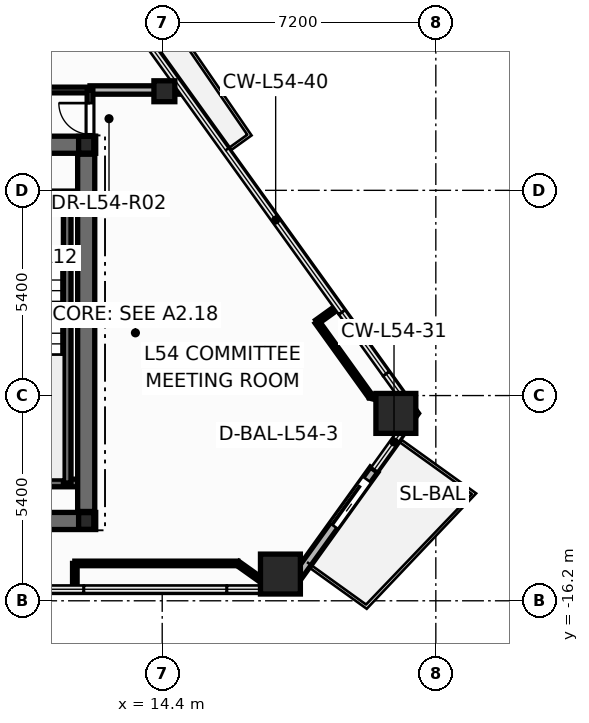
"""IFC4 building model, lengths in metres.
Left out: names, types, materials, properties, quantities, classifications, styles, units other than length and angle.
Written with IfcOpenShell. Run it as: python <this file> out.ifc"""

import sys

from ifc_helpers import new_model, si_unit, direction, frame, frame_2d, origin, origin_2d, place, context, subcontext, project, spatial, rectangle, hollow_rectangle, hollow_circle, i_section, extrude, element, fill, save


model = new_model("IFC4")
c1 = context("Model", 3, precision=1e-05, world=origin(), true_north=direction((0.0, 1.0)))
c2 = subcontext(c1, "Body", "Model", "MODEL_VIEW")
j1 = project(units=[si_unit("LENGTHUNIT", "METRE"), si_unit("PLANEANGLEUNIT", "RADIAN")], contexts=[c1])
p1 = place(None, origin())
s1 = spatial("IfcSite", under=j1, at=p1, CompositionType="ELEMENT")
p2 = place(p1, origin())
s2 = spatial("IfcBuilding", under=s1, at=p2, CompositionType="ELEMENT")
p3 = place(p2, frame((0.0, 0.0, 207.3)))
s3 = spatial("IfcBuildingStorey", under=s2, at=p3, CompositionType="ELEMENT", Elevation=207.3)
for number, where, z_axis, x_axis in (
    (1, (17.511, -15.497, 0.0), (0.0, 0.0, 1.0), (1.0, 0.0, 0.0)),
    (2, (20.548, -11.27, 0.0), (0.0, 0.0, 1.0), (1.0, 0.0, 0.0)),
):
    element("IfcColumn", number, at=place(p3, frame(where, z_axis=z_axis, x_axis=x_axis)), inside=s3, PredefinedType="COLUMN", context=c2, shape_type="SweptSolid", body=[
        extrude(hollow_rectangle(XDim=1.05, YDim=1.05, WallThickness=0.045, at=origin_2d()), origin(), (0.0, 0.0, 1.0), 3.6),
    ])
p4 = place(p3, frame((14.457, -2.793, 0.0), z_axis=(0.0, 0.0, 1.0), x_axis=(1.0, 0.0, 0.0)))
e3 = element("IfcColumn", 3, at=p4, inside=s3, PredefinedType="COLUMN", context=c2, shape_type="SweptSolid", body=[
    extrude(hollow_circle(Radius=0.275, WallThickness=0.024, at=origin_2d()), origin(), (0.0, 0.0, 1.0), 3.6),
])
for number, where, z_axis, x_axis in (
    (4, (12.4, -14.1, 0.0), (0.0, 0.0, 1.0), (1.0, 0.0, 0.0)),
    (5, (12.4, -4.2, 0.0), (0.0, 0.0, 1.0), (1.0, 0.0, 0.0)),
):
    element("IfcColumn", number, at=place(p3, frame(where, z_axis=z_axis, x_axis=x_axis)), inside=s3, PredefinedType="COLUMN", context=c2, shape_type="SweptSolid", body=[
        extrude(i_section(OverallWidth=0.4, OverallDepth=0.44, WebThickness=0.028, FlangeThickness=0.04, at=origin_2d()), origin(), (0.0, 0.0, 1.0), 3.6),
    ])
p5 = place(p3, frame((17.739, -15.864, -0.015), z_axis=(0.0, 0.0, 1.0), x_axis=(0.5835494265, 0.812077623649, 0.0)))
e6 = element("IfcWall", 6, at=p5, inside=s3, PredefinedType="STANDARD", context=c2, shape_type="SweptSolid", body=[
    extrude(rectangle(XDim=3.833, YDim=0.24, at=frame_2d((1.917, 0.0))), origin(), (0.0, 0.0, 1.0), 2.802),
])
p6 = place(p5, frame((2.013, 0.0, 0.015)))
e7 = element("IfcOpeningElement", 7, at=p6, cuts=e6, PredefinedType="OPENING", context=c2, shape_type="SweptSolid", body=[
    extrude(rectangle(XDim=1.506, YDim=2.204, at=frame_2d((0.75, 1.102))), frame((0.0, 0.13, 0.0), z_axis=(0.0, -1.0, 0.0), x_axis=(1.0, 0.0, 0.0)), (0.0, 0.0, 1.0), 0.26),
])
p7 = place(p3, frame((-12.65, -14.1, 0.0), z_axis=(0.0, 0.0, 1.0), x_axis=(1.0, 0.0, 0.0)))
e8 = element("IfcWall", 8, at=p7, inside=s3, PredefinedType="SHEAR", context=c2, shape_type="SweptSolid", body=[
    extrude(rectangle(XDim=25.3, YDim=0.45, at=frame_2d((12.65, 0.0))), origin(), (0.0, 0.0, 1.0), 3.6),
])
p8 = place(p3, frame((-12.65, -4.2, 0.0), z_axis=(0.0, 0.0, 1.0), x_axis=(1.0, 0.0, 0.0)))
e9 = element("IfcWall", 9, at=p8, inside=s3, PredefinedType="SHEAR", context=c2, shape_type="SweptSolid", body=[
    extrude(rectangle(XDim=25.3, YDim=0.45, at=frame_2d((12.65, 0.0))), origin(), (0.0, 0.0, 1.0), 3.6),
])
p9 = place(p8, frame((1.85, 0.0, 0.0)))
e10 = element("IfcOpeningElement", 10, at=p9, cuts=e9, PredefinedType="OPENING", context=c2, shape_type="SweptSolid", body=[
    extrude(rectangle(XDim=0.756, YDim=2.054, at=frame_2d((0.375, 1.027))), frame((0.0, 0.235, 0.0), z_axis=(0.0, -1.0, 0.0), x_axis=(1.0, 0.0, 0.0)), (0.0, 0.0, 1.0), 0.47),
])
p10 = place(p8, frame((22.65, 0.0, 0.0)))
e11 = element("IfcOpeningElement", 11, at=p10, cuts=e9, PredefinedType="OPENING", context=c2, shape_type="SweptSolid", body=[
    extrude(rectangle(XDim=0.756, YDim=2.054, at=frame_2d((0.375, 1.027))), frame((0.0, 0.235, 0.0), z_axis=(0.0, -1.0, 0.0), x_axis=(1.0, 0.0, 0.0)), (0.0, 0.0, 1.0), 0.47),
])
p11 = place(p8, frame((5.85, 0.0, 0.0)))
e12 = element("IfcOpeningElement", 12, at=p11, cuts=e9, PredefinedType="OPENING", context=c2, shape_type="SweptSolid", body=[
    extrude(rectangle(XDim=1.006, YDim=2.104, at=frame_2d((0.5, 1.052))), frame((0.0, 0.235, 0.0), z_axis=(0.0, -1.0, 0.0), x_axis=(1.0, 0.0, 0.0)), (0.0, 0.0, 1.0), 0.47),
])
p12 = place(p8, frame((10.35, 0.0, 0.0)))
e13 = element("IfcOpeningElement", 13, at=p12, cuts=e9, PredefinedType="OPENING", context=c2, shape_type="SweptSolid", body=[
    extrude(rectangle(XDim=1.406, YDim=2.154, at=frame_2d((0.7, 1.077))), frame((0.0, 0.235, 0.0), z_axis=(0.0, -1.0, 0.0), x_axis=(1.0, 0.0, 0.0)), (0.0, 0.0, 1.0), 0.47),
])
p13 = place(p8, frame((18.45, 0.0, 0.0)))
e14 = element("IfcOpeningElement", 14, at=p13, cuts=e9, PredefinedType="OPENING", context=c2, shape_type="SweptSolid", body=[
    extrude(rectangle(XDim=1.006, YDim=2.104, at=frame_2d((0.5, 1.052))), frame((0.0, 0.235, 0.0), z_axis=(0.0, -1.0, 0.0), x_axis=(1.0, 0.0, 0.0)), (0.0, 0.0, 1.0), 0.47),
])
for number, where, z_axis, x_axis in (
    (15, (8.48, -5.52, 0.0), (0.0, 0.0, 1.0), (1.0, 0.0, 0.0)),
    (16, (8.48, -13.1, 0.0), (0.0, 0.0, 1.0), (1.0, 0.0, 0.0)),
):
    element("IfcWall", number, at=place(p3, frame(where, z_axis=z_axis, x_axis=x_axis)), inside=s3, PredefinedType="SOLIDWALL", context=c2, shape_type="SweptSolid", body=[
        extrude(rectangle(XDim=3.87, YDim=0.2, at=frame_2d((1.935, 0.0))), origin(), (0.0, 0.0, 1.0), 3.6),
    ])
p14 = place(p3, frame((11.9, -13.1, 0.0), z_axis=(0.0, 0.0, 1.0), x_axis=(0.0, 1.0, 0.0)))
e17 = element("IfcWall", 17, at=p14, inside=s3, PredefinedType="SOLIDWALL", context=c2, shape_type="SweptSolid", body=[
    extrude(rectangle(XDim=7.58, YDim=0.2, at=frame_2d((3.79, 0.0))), origin(), (0.0, 0.0, 1.0), 3.6),
])
p15 = place(p3, frame((12.4, -13.85, 0.0), z_axis=(0.0, 0.0, 1.0), x_axis=(0.0, 1.0, 0.0)))
e18 = element("IfcWall", 18, at=p15, inside=s3, PredefinedType="SHEAR", context=c2, shape_type="SweptSolid", body=[
    extrude(rectangle(XDim=9.4, YDim=0.45, at=frame_2d((4.7, 0.0))), origin(), (0.0, 0.0, 1.0), 3.6),
])
p16 = place(p3, frame((4.74, -2.76, 0.0), z_axis=(0.0, 0.0, 1.0), x_axis=(1.0, 0.0, 0.0)))
e19 = element("IfcWall", 19, at=p16, inside=s3, PredefinedType="PARTITIONING", context=c2, shape_type="SweptSolid", body=[
    extrude(rectangle(XDim=7.76, YDim=0.15, at=frame_2d((3.88, 0.0))), origin(), (0.0, 0.0, 1.0), 2.32),
])
p17 = place(p16, frame((4.022, 0.0, 0.0)))
e20 = element("IfcOpeningElement", 20, at=p17, cuts=e19, PredefinedType="OPENING", context=c2, shape_type="SweptSolid", body=[
    extrude(rectangle(XDim=0.956, YDim=2.104, at=frame_2d((0.475, 1.052))), frame((0.0, 0.085, 0.0), z_axis=(0.0, -1.0, 0.0), x_axis=(1.0, 0.0, 0.0)), (0.0, 0.0, 1.0), 0.17),
])
p18 = place(p3, frame((12.101, -15.217, 0.0), z_axis=(0.0, 0.0, 1.0), x_axis=(1.0, 0.0, 0.0)))
e21 = element("IfcWall", 21, at=p18, inside=s3, PredefinedType="PARTITIONING", context=c2, shape_type="SweptSolid", body=[
    extrude(rectangle(XDim=4.288, YDim=0.12, at=frame_2d((2.144, 0.0))), origin(), (0.0, 0.0, 1.0), 3.345),
])
p19 = place(p3, frame((12.5, -2.76, 0.0), z_axis=(0.0, 0.0, 1.0), x_axis=(1.0, 0.0, 0.0)))
e22 = element("IfcWall", 22, at=p19, inside=s3, PredefinedType="PARTITIONING", context=c2, shape_type="SweptSolid", body=[
    extrude(rectangle(XDim=2.426, YDim=0.22, at=frame_2d((1.213, 0.0))), origin(), (0.0, 0.0, 1.0), 2.62),
])
p20 = place(p3, frame((19.874, -10.811, 0.0), z_axis=(0.0, 0.0, 1.0), x_axis=(-0.583564770882, 0.812066597137, 0.0)))
e23 = element("IfcWall", 23, at=p20, inside=s3, PredefinedType="PARTITIONING", context=c2, shape_type="SweptSolid", body=[
    extrude(rectangle(XDim=2.4, YDim=0.12, at=frame_2d((1.2, 0.0))), origin(), (0.0, 0.0, 1.0), 2.32),
])
p21 = place(p3, frame((12.5, -4.24, 0.0), z_axis=(0.0, 0.0, 1.0), x_axis=(0.0, 1.0, 0.0)))
e24 = element("IfcWall", 24, at=p21, inside=s3, PredefinedType="PARTITIONING", context=c2, shape_type="SweptSolid", body=[
    extrude(rectangle(XDim=1.48, YDim=0.15, at=frame_2d((0.74, 0.0))), origin(), (0.0, 0.0, 1.0), 2.32),
])
p22 = place(p21, frame((0.315, 0.0, 0.0)))
e25 = element("IfcOpeningElement", 25, at=p22, cuts=e24, PredefinedType="OPENING", context=c2, shape_type="SweptSolid", body=[
    extrude(rectangle(XDim=0.826, YDim=2.104, at=frame_2d((0.41, 1.052))), frame((0.0, 0.085, 0.0), z_axis=(0.0, -1.0, 0.0), x_axis=(1.0, 0.0, 0.0)), (0.0, 0.0, 1.0), 0.17),
])
p23 = place(p3, frame((16.389, -15.217, 0.0), z_axis=(0.0, 0.0, 1.0), x_axis=(0.814775258606, -0.579776920861, 0.0)))
e26 = element("IfcWall", 26, at=p23, inside=s3, PredefinedType="PARTITIONING", context=c2, shape_type="SweptSolid", body=[
    extrude(rectangle(XDim=0.854, YDim=0.12, at=frame_2d((0.427, 0.0))), origin(), (0.0, 0.0, 1.0), 2.787),
])
p24 = place(p3, frame((20.698, -11.027, 0.0), z_axis=(0.0, 0.0, 1.0), x_axis=(-0.967403978064, 0.253238115667, 0.0)))
e27 = element("IfcWall", 27, at=p24, inside=s3, PredefinedType="PARTITIONING", context=c2, shape_type="SweptSolid", body=[
    extrude(rectangle(XDim=0.852, YDim=0.12, at=frame_2d((0.426, 0.0))), origin(), (0.0, 0.0, 1.0), 2.32),
])
for number, where, z_axis, x_axis in (
    (28, (12.101, -15.887, 0.0), (0.0, 0.0, 1.0), (0.0, 1.0, 0.0)),
    (29, (18.474, -8.862, 0.0), (0.0, 0.0, 1.0), (0.812, 0.584, 0.0)),
):
    element("IfcWall", number, at=place(p3, frame(where, z_axis=z_axis, x_axis=x_axis)), inside=s3, PredefinedType="PARTITIONING", context=c2, shape_type="SweptSolid", body=[
        extrude(rectangle(XDim=0.67, YDim=0.12, at=frame_2d((0.335, 0.0))), origin(), (0.0, 0.0, 1.0), 2.787),
    ])
p25 = place(p6, origin())
e30 = element("IfcDoor", 30, at=p25, inside=s3, OperationType="SLIDING_TO_RIGHT", PredefinedType="DOOR", context=c2, shape_type="SweptSolid", body=[
    extrude(rectangle(XDim=1.5, YDim=2.2, at=frame_2d((0.75, 1.1))), frame((0.0, 0.025, 0.0), z_axis=(0.0, -1.0, 0.0), x_axis=(1.0, 0.0, 0.0)), (0.0, 0.0, 1.0), 0.05),
])
fill(e7, e30)
p26 = place(p22, origin())
e31 = element("IfcDoor", 31, at=p26, inside=s3, OperationType="SINGLE_SWING_RIGHT", PredefinedType="DOOR", context=c2, shape_type="SweptSolid", body=[
    extrude(rectangle(XDim=0.82, YDim=2.1, at=frame_2d((0.41, 1.05))), frame((0.0, 0.025, 0.0), z_axis=(0.0, -1.0, 0.0), x_axis=(1.0, 0.0, 0.0)), (0.0, 0.0, 1.0), 0.05),
])
fill(e25, e31)
save(model, sys.argv[1])
